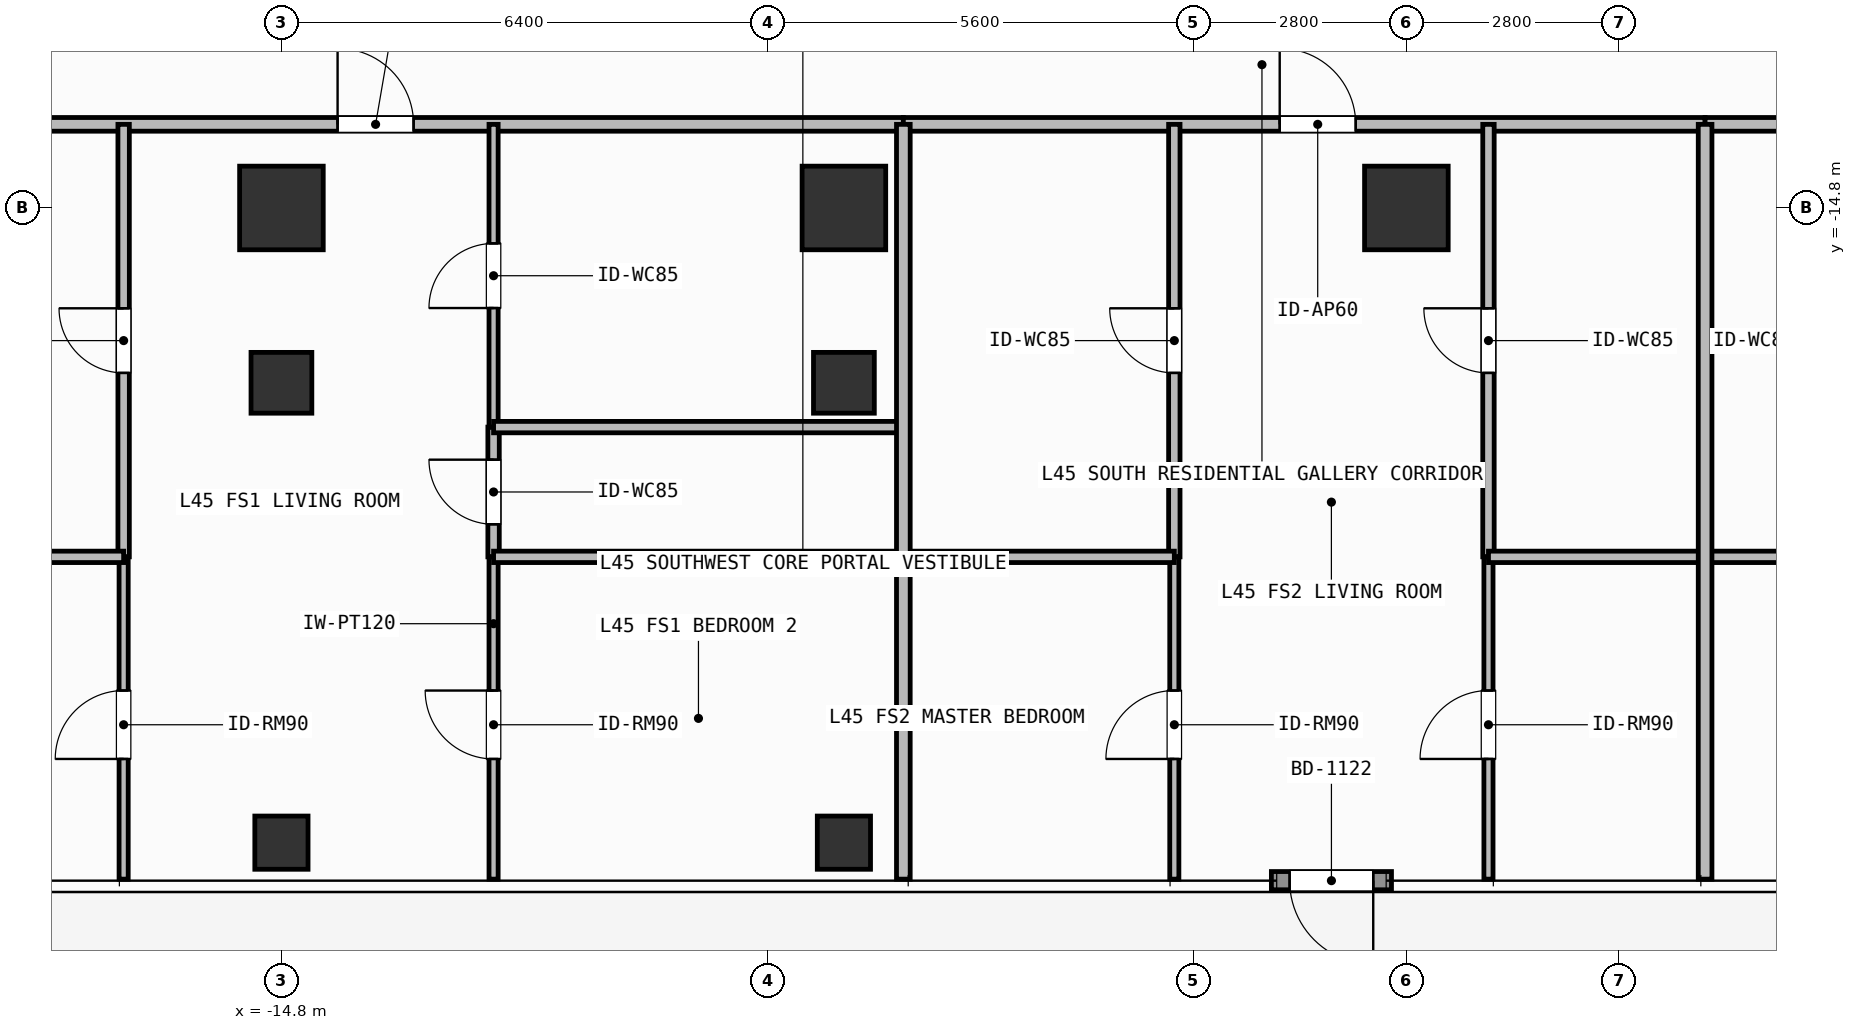
"""IFC4 building model, lengths in metres.
Left out: names, types, materials, properties, quantities, classifications, styles, units other than length and angle.
Written with IfcOpenShell. Run it as: python <this file> out.ifc"""

import sys

from ifc_helpers import new_model, si_unit, direction, frame, frame_2d, origin, origin_2d, place, context, subcontext, project, spatial, rectangle, hollow_rectangle, extrude, element, fill, save


model = new_model("IFC4")
c1 = context("Model", 3, precision=1e-05, world=origin(), true_north=direction((0.0, 1.0)))
c2 = subcontext(c1, "Body", "Model", "MODEL_VIEW")
j1 = project(units=[si_unit("LENGTHUNIT", "METRE"), si_unit("PLANEANGLEUNIT", "RADIAN")], contexts=[c1])
p1 = place(None, origin())
s1 = spatial("IfcSite", under=j1, at=p1, CompositionType="ELEMENT")
p2 = place(p1, origin())
s2 = spatial("IfcBuilding", under=s1, at=p2, CompositionType="ELEMENT")
p3 = place(p2, frame((0.0, 0.0, 183.6)))
s3 = spatial("IfcBuildingStorey", under=s2, at=p3, CompositionType="ELEMENT", Elevation=183.6)
for number, where, z_axis, x_axis in (
    (1, (-14.8, -14.8, 0.0), (0.0, 0.0, 1.0), (1.0, 0.0, 0.0)),
    (2, (-7.4, -14.8, 0.0), (0.0, 0.0, 1.0), (1.0, 0.0, 0.0)),
    (3, (0.0, -14.8, 0.0), (0.0, 0.0, 1.0), (1.0, 0.0, 0.0)),
):
    element("IfcColumn", number, at=place(p3, frame(where, z_axis=z_axis, x_axis=x_axis)), inside=s3, PredefinedType="COLUMN", context=c2, shape_type="SweptSolid", body=[
        extrude(rectangle(XDim=1.1, YDim=1.1, at=origin_2d()), origin(), (0.0, 0.0, 1.0), 3.9),
    ])
for number, where, z_axis, x_axis in (
    (4, (-14.8, -17.1, 0.0), (0.0, 0.0, 1.0), (1.0, 0.0, 0.0)),
    (5, (-7.4, -17.1, 0.0), (0.0, 0.0, 1.0), (1.0, 0.0, 0.0)),
):
    element("IfcColumn", number, at=place(p3, frame(where, z_axis=z_axis, x_axis=x_axis)), inside=s3, PredefinedType="COLUMN", context=c2, shape_type="SweptSolid", body=[
        extrude(hollow_rectangle(XDim=0.8, YDim=0.8, WallThickness=0.036, at=origin_2d()), origin(), (0.0, 0.0, 1.0), 3.9),
    ])
for number, where, z_axis, x_axis in (
    (6, (-14.8, -23.15, 0.0), (0.0, 0.0, 1.0), (1.0, 0.0, 0.0)),
    (7, (-7.4, -23.15, 0.0), (0.0, 0.0, 1.0), (1.0, 0.0, 0.0)),
):
    element("IfcColumn", number, at=place(p3, frame(where, z_axis=z_axis, x_axis=x_axis)), inside=s3, PredefinedType="COLUMN", context=c2, shape_type="SweptSolid", body=[
        extrude(hollow_rectangle(XDim=0.7, YDim=0.7, WallThickness=0.032, at=origin_2d()), origin(), (0.0, 0.0, 1.0), 3.9),
    ])
p4 = place(p3, frame((-0.196, -23.65, 0.0), z_axis=(0.0, 0.0, 1.0), x_axis=(-1.0, 0.0, 0.0)))
e8 = element("IfcWall", 8, at=p4, inside=s3, PredefinedType="SOLIDWALL", context=c2, shape_type="SweptSolid", body=[
    extrude(rectangle(XDim=1.58, YDim=0.24, at=frame_2d((0.79, 0.0))), origin(), (0.0, 0.0, 1.0), 3.68),
])
p5 = place(p4, frame((0.24, 0.0, 0.0)))
e9 = element("IfcOpeningElement", 9, at=p5, cuts=e8, PredefinedType="OPENING", context=c2, shape_type="SweptSolid", body=[
    extrude(rectangle(XDim=1.1, YDim=2.2, at=frame_2d((0.55, 1.1))), frame((0.0, 0.13, 0.0), z_axis=(0.0, -1.0, 0.0), x_axis=(1.0, 0.0, 0.0)), (0.0, 0.0, 1.0), 0.26),
])
p6 = place(p3, frame((-22.12, -13.7, 0.0), z_axis=(0.0, 0.0, 1.0), x_axis=(1.0, 0.0, 0.0)))
e10 = element("IfcWall", 10, at=p6, inside=s3, PredefinedType="PARTITIONING", context=c2, shape_type="SweptSolid", body=[
    extrude(rectangle(XDim=15.502, YDim=0.18, at=frame_2d((7.751, 0.0))), origin(), (0.0, 0.0, 1.0), 3.68),
])
p7 = place(p6, frame((8.059, 0.0, 0.0)))
e11 = element("IfcOpeningElement", 11, at=p7, cuts=e10, PredefinedType="OPENING", context=c2, shape_type="SweptSolid", body=[
    extrude(rectangle(XDim=1.0, YDim=2.2, at=frame_2d((0.5, 1.1))), frame((0.0, 0.1, 0.0), z_axis=(0.0, -1.0, 0.0), x_axis=(1.0, 0.0, 0.0)), (0.0, 0.0, 1.0), 0.2),
])
p8 = place(p3, frame((-16.876, -19.39, 0.0), z_axis=(0.0, 0.0, 1.0), x_axis=(0.0, 1.0, 0.0)))
e12 = element("IfcWall", 12, at=p8, inside=s3, PredefinedType="PARTITIONING", context=c2, shape_type="SweptSolid", body=[
    extrude(rectangle(XDim=5.69, YDim=0.15, at=frame_2d((2.845, 0.0))), origin(), (0.0, 0.0, 1.0), 3.68),
])
p9 = place(p8, frame((2.42, 0.0, 0.0)))
e13 = element("IfcOpeningElement", 13, at=p9, cuts=e12, PredefinedType="OPENING", context=c2, shape_type="SweptSolid", body=[
    extrude(rectangle(XDim=0.85, YDim=2.1, at=frame_2d((0.425, 1.05))), frame((0.0, 0.085, 0.0), z_axis=(0.0, -1.0, 0.0), x_axis=(1.0, 0.0, 0.0)), (0.0, 0.0, 1.0), 0.17),
])
p10 = place(p3, frame((-16.876, -23.63, 0.0), z_axis=(0.0, 0.0, 1.0), x_axis=(0.0, 1.0, 0.0)))
e14 = element("IfcWall", 14, at=p10, inside=s3, PredefinedType="PARTITIONING", context=c2, shape_type="SweptSolid", body=[
    extrude(rectangle(XDim=4.24, YDim=0.12, at=frame_2d((2.12, 0.0))), origin(), (0.0, 0.0, 1.0), 3.68),
])
p11 = place(p10, frame((1.581, 0.0, 0.0)))
e15 = element("IfcOpeningElement", 15, at=p11, cuts=e14, PredefinedType="OPENING", context=c2, shape_type="SweptSolid", body=[
    extrude(rectangle(XDim=0.9, YDim=2.1, at=frame_2d((0.45, 1.05))), frame((0.0, 0.07, 0.0), z_axis=(0.0, -1.0, 0.0), x_axis=(1.0, 0.0, 0.0)), (0.0, 0.0, 1.0), 0.14),
])
p12 = place(p3, frame((-12.009, -19.39, 0.0), z_axis=(0.0, 0.0, 1.0), x_axis=(0.0, 1.0, 0.0)))
e16 = element("IfcWall", 16, at=p12, inside=s3, PredefinedType="PARTITIONING", context=c2, shape_type="SweptSolid", body=[
    extrude(rectangle(XDim=1.707, YDim=0.15, at=frame_2d((0.854, 0.0))), origin(), (0.0, 0.0, 1.0), 3.68),
])
p13 = place(p12, frame((0.428, 0.0, 0.0)))
e17 = element("IfcOpeningElement", 17, at=p13, cuts=e16, PredefinedType="OPENING", context=c2, shape_type="SweptSolid", body=[
    extrude(rectangle(XDim=0.85, YDim=2.1, at=frame_2d((0.425, 1.05))), frame((0.0, 0.085, 0.0), z_axis=(0.0, -1.0, 0.0), x_axis=(1.0, 0.0, 0.0)), (0.0, 0.0, 1.0), 0.17),
])
p14 = place(p3, frame((-12.009, -17.683, 0.0), z_axis=(0.0, 0.0, 1.0), x_axis=(0.0, 1.0, 0.0)))
e18 = element("IfcWall", 18, at=p14, inside=s3, PredefinedType="PARTITIONING", context=c2, shape_type="SweptSolid", body=[
    extrude(rectangle(XDim=3.983, YDim=0.12, at=frame_2d((1.992, 0.0))), origin(), (0.0, 0.0, 1.0), 3.68),
])
p15 = place(p14, frame((1.566, 0.0, 0.0)))
e19 = element("IfcOpeningElement", 19, at=p15, cuts=e18, PredefinedType="OPENING", context=c2, shape_type="SweptSolid", body=[
    extrude(rectangle(XDim=0.85, YDim=2.1, at=frame_2d((0.425, 1.05))), frame((0.0, 0.07, 0.0), z_axis=(0.0, -1.0, 0.0), x_axis=(1.0, 0.0, 0.0)), (0.0, 0.0, 1.0), 0.14),
])
p16 = place(p3, frame((-12.009, -23.63, 0.0), z_axis=(0.0, 0.0, 1.0), x_axis=(0.0, 1.0, 0.0)))
e20 = element("IfcWall", 20, at=p16, inside=s3, PredefinedType="PARTITIONING", context=c2, shape_type="SweptSolid", body=[
    extrude(rectangle(XDim=4.24, YDim=0.12, at=frame_2d((2.12, 0.0))), origin(), (0.0, 0.0, 1.0), 3.68),
])
p17 = place(p16, frame((1.581, 0.0, 0.0)))
e21 = element("IfcOpeningElement", 21, at=p17, cuts=e20, PredefinedType="OPENING", context=c2, shape_type="SweptSolid", body=[
    extrude(rectangle(XDim=0.9, YDim=2.1, at=frame_2d((0.45, 1.05))), frame((0.0, 0.07, 0.0), z_axis=(0.0, -1.0, 0.0), x_axis=(1.0, 0.0, 0.0)), (0.0, 0.0, 1.0), 0.14),
])
p18 = place(p3, frame((-6.618, -13.7, 0.0), z_axis=(0.0, 0.0, 1.0), x_axis=(1.0, 0.0, 0.0)))
e22 = element("IfcWall", 22, at=p18, inside=s3, PredefinedType="PARTITIONING", context=c2, shape_type="SweptSolid", body=[
    extrude(rectangle(XDim=10.548, YDim=0.18, at=frame_2d((5.274, 0.0))), origin(), (0.0, 0.0, 1.0), 3.68),
])
p19 = place(p18, frame((4.951, 0.0, 0.0)))
e23 = element("IfcOpeningElement", 23, at=p19, cuts=e22, PredefinedType="OPENING", context=c2, shape_type="SweptSolid", body=[
    extrude(rectangle(XDim=1.0, YDim=2.2, at=frame_2d((0.5, 1.1))), frame((0.0, 0.1, 0.0), z_axis=(0.0, -1.0, 0.0), x_axis=(1.0, 0.0, 0.0)), (0.0, 0.0, 1.0), 0.2),
])
p20 = place(p3, frame((-3.053, -19.39, 0.0), z_axis=(0.0, 0.0, 1.0), x_axis=(0.0, 1.0, 0.0)))
e24 = element("IfcWall", 24, at=p20, inside=s3, PredefinedType="PARTITIONING", context=c2, shape_type="SweptSolid", body=[
    extrude(rectangle(XDim=5.69, YDim=0.15, at=frame_2d((2.845, 0.0))), origin(), (0.0, 0.0, 1.0), 3.68),
])
p21 = place(p20, frame((2.42, 0.0, 0.0)))
e25 = element("IfcOpeningElement", 25, at=p21, cuts=e24, PredefinedType="OPENING", context=c2, shape_type="SweptSolid", body=[
    extrude(rectangle(XDim=0.85, YDim=2.1, at=frame_2d((0.425, 1.05))), frame((0.0, 0.085, 0.0), z_axis=(0.0, -1.0, 0.0), x_axis=(1.0, 0.0, 0.0)), (0.0, 0.0, 1.0), 0.17),
])
p22 = place(p3, frame((-3.053, -23.63, 0.0), z_axis=(0.0, 0.0, 1.0), x_axis=(0.0, 1.0, 0.0)))
e26 = element("IfcWall", 26, at=p22, inside=s3, PredefinedType="PARTITIONING", context=c2, shape_type="SweptSolid", body=[
    extrude(rectangle(XDim=4.24, YDim=0.12, at=frame_2d((2.12, 0.0))), origin(), (0.0, 0.0, 1.0), 3.68),
])
p23 = place(p22, frame((1.581, 0.0, 0.0)))
e27 = element("IfcOpeningElement", 27, at=p23, cuts=e26, PredefinedType="OPENING", context=c2, shape_type="SweptSolid", body=[
    extrude(rectangle(XDim=0.9, YDim=2.1, at=frame_2d((0.45, 1.05))), frame((0.0, 0.07, 0.0), z_axis=(0.0, -1.0, 0.0), x_axis=(1.0, 0.0, 0.0)), (0.0, 0.0, 1.0), 0.14),
])
p24 = place(p3, frame((1.08, -19.39, 0.0), z_axis=(0.0, 0.0, 1.0), x_axis=(0.0, 1.0, 0.0)))
e28 = element("IfcWall", 28, at=p24, inside=s3, PredefinedType="PARTITIONING", context=c2, shape_type="SweptSolid", body=[
    extrude(rectangle(XDim=5.69, YDim=0.15, at=frame_2d((2.845, 0.0))), origin(), (0.0, 0.0, 1.0), 3.68),
])
p25 = place(p24, frame((2.42, 0.0, 0.0)))
e29 = element("IfcOpeningElement", 29, at=p25, cuts=e28, PredefinedType="OPENING", context=c2, shape_type="SweptSolid", body=[
    extrude(rectangle(XDim=0.85, YDim=2.1, at=frame_2d((0.425, 1.05))), frame((0.0, 0.085, 0.0), z_axis=(0.0, -1.0, 0.0), x_axis=(1.0, 0.0, 0.0)), (0.0, 0.0, 1.0), 0.17),
])
p26 = place(p3, frame((1.08, -23.63, 0.0), z_axis=(0.0, 0.0, 1.0), x_axis=(0.0, 1.0, 0.0)))
e30 = element("IfcWall", 30, at=p26, inside=s3, PredefinedType="PARTITIONING", context=c2, shape_type="SweptSolid", body=[
    extrude(rectangle(XDim=4.24, YDim=0.12, at=frame_2d((2.12, 0.0))), origin(), (0.0, 0.0, 1.0), 3.68),
])
p27 = place(p26, frame((1.581, 0.0, 0.0)))
e31 = element("IfcOpeningElement", 31, at=p27, cuts=e30, PredefinedType="OPENING", context=c2, shape_type="SweptSolid", body=[
    extrude(rectangle(XDim=0.9, YDim=2.1, at=frame_2d((0.45, 1.05))), frame((0.0, 0.07, 0.0), z_axis=(0.0, -1.0, 0.0), x_axis=(1.0, 0.0, 0.0)), (0.0, 0.0, 1.0), 0.14),
])
p28 = place(p3, frame((3.93, -13.7, 0.0), z_axis=(0.0, 0.0, 1.0), x_axis=(1.0, 0.0, 0.0)))
e32 = element("IfcWall", 32, at=p28, inside=s3, PredefinedType="PARTITIONING", context=c2, shape_type="SweptSolid", body=[
    extrude(rectangle(XDim=14.39, YDim=0.18, at=frame_2d((7.195, 0.0))), origin(), (0.0, 0.0, 1.0), 3.68),
])
p29 = place(p28, frame((6.605, 0.0, 0.0)))
e33 = element("IfcOpeningElement", 33, at=p29, cuts=e32, PredefinedType="OPENING", context=c2, shape_type="SweptSolid", body=[
    extrude(rectangle(XDim=1.0, YDim=2.2, at=frame_2d((0.5, 1.1))), frame((0.0, 0.1, 0.0), z_axis=(0.0, -1.0, 0.0), x_axis=(1.0, 0.0, 0.0)), (0.0, 0.0, 1.0), 0.2),
])
p30 = place(p3, frame((-22.12, -19.39, 0.0), z_axis=(0.0, 0.0, 1.0), x_axis=(1.0, 0.0, 0.0)))
e34 = element("IfcWall", 34, at=p30, inside=s3, PredefinedType="PARTITIONING", context=c2, shape_type="SweptSolid", body=[
    extrude(rectangle(XDim=5.244, YDim=0.15, at=frame_2d((2.622, 0.0))), origin(), (0.0, 0.0, 1.0), 3.68),
])
for number, where, z_axis, x_axis in (
    (35, (-12.009, -17.683, 0.0), (0.0, 0.0, 1.0), (1.0, 0.0, 0.0)),
    (36, (-12.009, -19.39, 0.0), (0.0, 0.0, 1.0), (1.0, 0.0, 0.0)),
):
    element("IfcWall", number, at=place(p3, frame(where, z_axis=z_axis, x_axis=x_axis)), inside=s3, PredefinedType="PARTITIONING", context=c2, shape_type="SweptSolid", body=[
        extrude(rectangle(XDim=5.391, YDim=0.15, at=frame_2d((2.696, 0.0))), origin(), (0.0, 0.0, 1.0), 3.68),
    ])
p31 = place(p3, frame((-6.618, -19.39, 0.0), z_axis=(0.0, 0.0, 1.0), x_axis=(1.0, 0.0, 0.0)))
e37 = element("IfcWall", 37, at=p31, inside=s3, PredefinedType="PARTITIONING", context=c2, shape_type="SweptSolid", body=[
    extrude(rectangle(XDim=3.565, YDim=0.15, at=frame_2d((1.782, 0.0))), origin(), (0.0, 0.0, 1.0), 3.68),
])
p32 = place(p3, frame((1.08, -19.39, 0.0), z_axis=(0.0, 0.0, 1.0), x_axis=(1.0, 0.0, 0.0)))
e38 = element("IfcWall", 38, at=p32, inside=s3, PredefinedType="PARTITIONING", context=c2, shape_type="SweptSolid", body=[
    extrude(rectangle(XDim=2.85, YDim=0.15, at=frame_2d((1.425, 0.0))), origin(), (0.0, 0.0, 1.0), 3.68),
])
p33 = place(p3, frame((-6.618, -23.63, 0.0), z_axis=(0.0, 0.0, 1.0), x_axis=(0.0, 1.0, 0.0)))
e39 = element("IfcWall", 39, at=p33, inside=s3, PredefinedType="PARTITIONING", context=c2, shape_type="SweptSolid", body=[
    extrude(rectangle(XDim=9.93, YDim=0.18, at=frame_2d((4.965, 0.0))), origin(), (0.0, 0.0, 1.0), 3.68),
])
p34 = place(p3, frame((3.93, -19.39, 0.0), z_axis=(0.0, 0.0, 1.0), x_axis=(1.0, 0.0, 0.0)))
e40 = element("IfcWall", 40, at=p34, inside=s3, PredefinedType="PARTITIONING", context=c2, shape_type="SweptSolid", body=[
    extrude(rectangle(XDim=5.442, YDim=0.15, at=frame_2d((2.721, 0.0))), origin(), (0.0, 0.0, 1.0), 3.68),
])
p35 = place(p3, frame((3.93, -23.63, 0.0), z_axis=(0.0, 0.0, 1.0), x_axis=(0.0, 1.0, 0.0)))
e41 = element("IfcWall", 41, at=p35, inside=s3, PredefinedType="PARTITIONING", context=c2, shape_type="SweptSolid", body=[
    extrude(rectangle(XDim=9.93, YDim=0.18, at=frame_2d((4.965, 0.0))), origin(), (0.0, 0.0, 1.0), 3.68),
])
p36 = place(p5, origin())
e42 = element("IfcDoor", 42, at=p36, inside=s3, OperationType="SINGLE_SWING_LEFT", PredefinedType="DOOR", context=c2, shape_type="SweptSolid", body=[
    extrude(rectangle(XDim=1.1, YDim=2.2, at=frame_2d((0.55, 1.1))), frame((0.0, 0.025, 0.0), z_axis=(0.0, -1.0, 0.0), x_axis=(1.0, 0.0, 0.0)), (0.0, 0.0, 1.0), 0.05),
])
fill(e9, e42)
p37 = place(p7, origin())
e43 = element("IfcDoor", 43, at=p37, inside=s3, OperationType="SINGLE_SWING_LEFT", PredefinedType="DOOR", context=c2, shape_type="SweptSolid", body=[
    extrude(rectangle(XDim=1.0, YDim=2.2, at=frame_2d((0.5, 1.1))), frame((0.0, 0.025, 0.0), z_axis=(0.0, -1.0, 0.0), x_axis=(1.0, 0.0, 0.0)), (0.0, 0.0, 1.0), 0.05),
])
fill(e11, e43)
p38 = place(p9, origin())
e44 = element("IfcDoor", 44, at=p38, inside=s3, OperationType="SINGLE_SWING_RIGHT", PredefinedType="DOOR", context=c2, shape_type="SweptSolid", body=[
    extrude(rectangle(XDim=0.85, YDim=2.1, at=frame_2d((0.425, 1.05))), frame((0.0, 0.025, 0.0), z_axis=(0.0, -1.0, 0.0), x_axis=(1.0, 0.0, 0.0)), (0.0, 0.0, 1.0), 0.05),
])
fill(e13, e44)
p39 = place(p11, origin())
e45 = element("IfcDoor", 45, at=p39, inside=s3, OperationType="SINGLE_SWING_LEFT", PredefinedType="DOOR", context=c2, shape_type="SweptSolid", body=[
    extrude(rectangle(XDim=0.9, YDim=2.1, at=frame_2d((0.45, 1.05))), frame((0.0, 0.025, 0.0), z_axis=(0.0, -1.0, 0.0), x_axis=(1.0, 0.0, 0.0)), (0.0, 0.0, 1.0), 0.05),
])
fill(e15, e45)
p40 = place(p13, origin())
e46 = element("IfcDoor", 46, at=p40, inside=s3, OperationType="SINGLE_SWING_RIGHT", PredefinedType="DOOR", context=c2, shape_type="SweptSolid", body=[
    extrude(rectangle(XDim=0.85, YDim=2.1, at=frame_2d((0.425, 1.05))), frame((0.0, 0.025, 0.0), z_axis=(0.0, -1.0, 0.0), x_axis=(1.0, 0.0, 0.0)), (0.0, 0.0, 1.0), 0.05),
])
fill(e17, e46)
p41 = place(p15, origin())
e47 = element("IfcDoor", 47, at=p41, inside=s3, OperationType="SINGLE_SWING_LEFT", PredefinedType="DOOR", context=c2, shape_type="SweptSolid", body=[
    extrude(rectangle(XDim=0.85, YDim=2.1, at=frame_2d((0.425, 1.05))), frame((0.0, 0.025, 0.0), z_axis=(0.0, -1.0, 0.0), x_axis=(1.0, 0.0, 0.0)), (0.0, 0.0, 1.0), 0.05),
])
fill(e19, e47)
p42 = place(p17, origin())
e48 = element("IfcDoor", 48, at=p42, inside=s3, OperationType="SINGLE_SWING_RIGHT", PredefinedType="DOOR", context=c2, shape_type="SweptSolid", body=[
    extrude(rectangle(XDim=0.9, YDim=2.1, at=frame_2d((0.45, 1.05))), frame((0.0, 0.025, 0.0), z_axis=(0.0, -1.0, 0.0), x_axis=(1.0, 0.0, 0.0)), (0.0, 0.0, 1.0), 0.05),
])
fill(e21, e48)
p43 = place(p19, origin())
e49 = element("IfcDoor", 49, at=p43, inside=s3, OperationType="SINGLE_SWING_LEFT", PredefinedType="DOOR", context=c2, shape_type="SweptSolid", body=[
    extrude(rectangle(XDim=1.0, YDim=2.2, at=frame_2d((0.5, 1.1))), frame((0.0, 0.025, 0.0), z_axis=(0.0, -1.0, 0.0), x_axis=(1.0, 0.0, 0.0)), (0.0, 0.0, 1.0), 0.05),
])
fill(e23, e49)
p44 = place(p21, origin())
e50 = element("IfcDoor", 50, at=p44, inside=s3, OperationType="SINGLE_SWING_RIGHT", PredefinedType="DOOR", context=c2, shape_type="SweptSolid", body=[
    extrude(rectangle(XDim=0.85, YDim=2.1, at=frame_2d((0.425, 1.05))), frame((0.0, 0.025, 0.0), z_axis=(0.0, -1.0, 0.0), x_axis=(1.0, 0.0, 0.0)), (0.0, 0.0, 1.0), 0.05),
])
fill(e25, e50)
p45 = place(p23, origin())
e51 = element("IfcDoor", 51, at=p45, inside=s3, OperationType="SINGLE_SWING_LEFT", PredefinedType="DOOR", context=c2, shape_type="SweptSolid", body=[
    extrude(rectangle(XDim=0.9, YDim=2.1, at=frame_2d((0.45, 1.05))), frame((0.0, 0.025, 0.0), z_axis=(0.0, -1.0, 0.0), x_axis=(1.0, 0.0, 0.0)), (0.0, 0.0, 1.0), 0.05),
])
fill(e27, e51)
p46 = place(p25, origin())
e52 = element("IfcDoor", 52, at=p46, inside=s3, OperationType="SINGLE_SWING_RIGHT", PredefinedType="DOOR", context=c2, shape_type="SweptSolid", body=[
    extrude(rectangle(XDim=0.85, YDim=2.1, at=frame_2d((0.425, 1.05))), frame((0.0, 0.025, 0.0), z_axis=(0.0, -1.0, 0.0), x_axis=(1.0, 0.0, 0.0)), (0.0, 0.0, 1.0), 0.05),
])
fill(e29, e52)
p47 = place(p27, origin())
e53 = element("IfcDoor", 53, at=p47, inside=s3, OperationType="SINGLE_SWING_LEFT", PredefinedType="DOOR", context=c2, shape_type="SweptSolid", body=[
    extrude(rectangle(XDim=0.9, YDim=2.1, at=frame_2d((0.45, 1.05))), frame((0.0, 0.025, 0.0), z_axis=(0.0, -1.0, 0.0), x_axis=(1.0, 0.0, 0.0)), (0.0, 0.0, 1.0), 0.05),
])
fill(e31, e53)
save(model, sys.argv[1])
